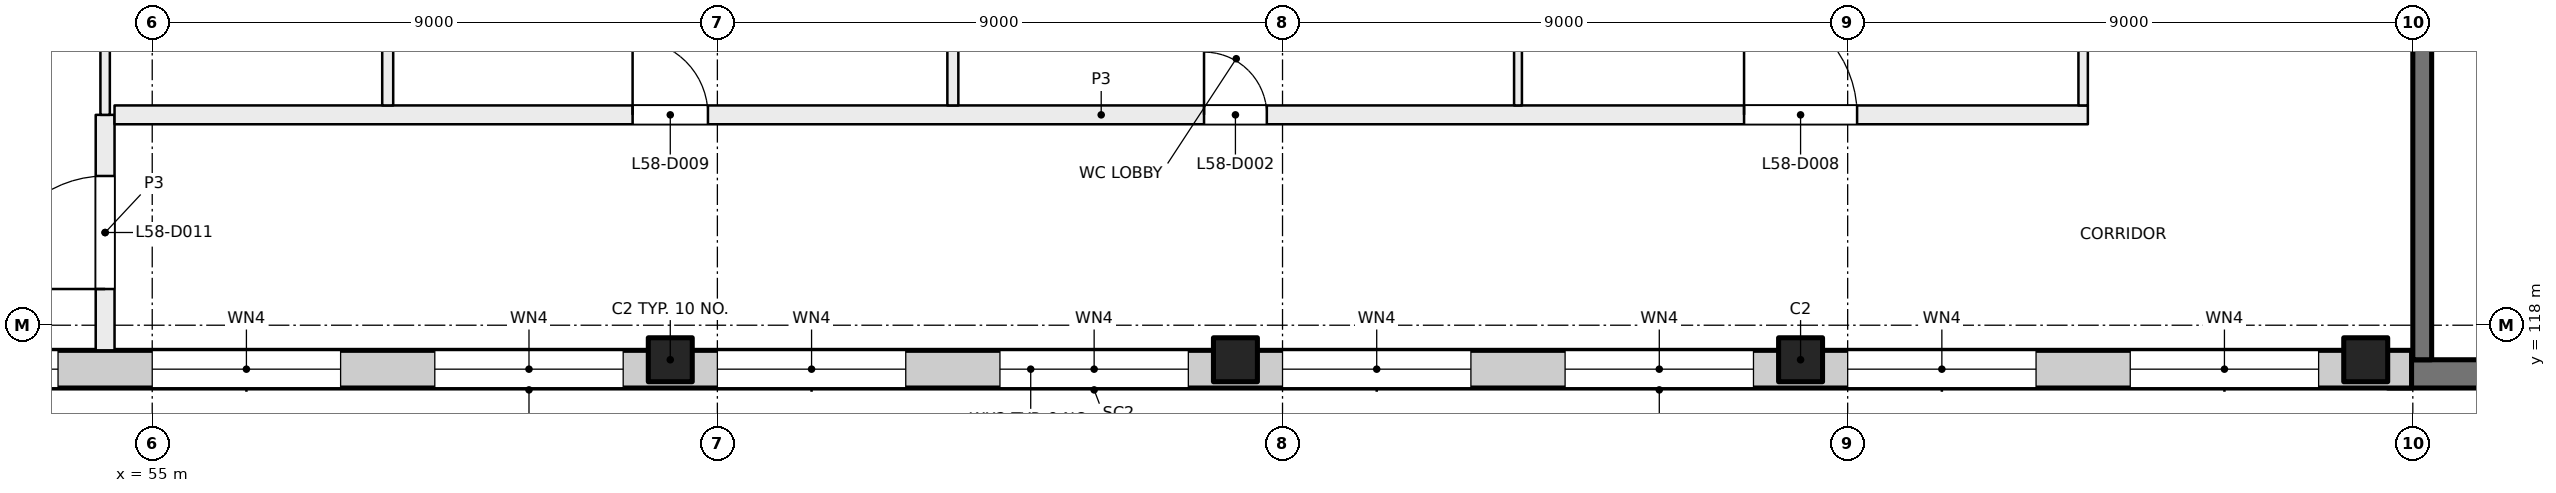
"""IFC4 building model, lengths in metres.
Left out: names, types, materials, properties, quantities, classifications, styles, units other than length and angle.
Written with IfcOpenShell. Run it as: python <this file> out.ifc"""

import sys

from ifc_helpers import new_model, si_unit, direction, frame, frame_2d, origin, origin_2d, place, context, subcontext, project, spatial, rectangle, extrude, element, fill, save


model = new_model("IFC4")
c1 = context("Model", 3, precision=1e-05, world=origin(), true_north=direction((0.0, 1.0)))
c2 = subcontext(c1, "Body", "Model", "MODEL_VIEW")
j1 = project(units=[si_unit("LENGTHUNIT", "METRE"), si_unit("PLANEANGLEUNIT", "RADIAN")], contexts=[c1])
p1 = place(None, origin())
s1 = spatial("IfcSite", under=j1, at=p1, CompositionType="ELEMENT")
p2 = place(p1, origin())
s2 = spatial("IfcBuilding", under=s1, at=p2, CompositionType="ELEMENT")
p3 = place(p2, frame((0.0, 0.0, 245.5)))
s3 = spatial("IfcBuildingStorey", under=s2, at=p3, CompositionType="ELEMENT", Elevation=245.5)
for number, where, z_axis, x_axis in (
    (1, (63.25, 117.45, 0.0), (0.0, 0.0, 1.0), (1.0, 0.0, 0.0)),
    (2, (72.25, 117.45, 0.0), (0.0, 0.0, 1.0), (1.0, 0.0, 0.0)),
    (3, (81.25, 117.45, 0.0), (0.0, 0.0, 1.0), (1.0, 0.0, 0.0)),
    (4, (90.25, 117.45, 0.0), (0.0, 0.0, 1.0), (1.0, 0.0, 0.0)),
):
    element("IfcColumn", number, at=place(p3, frame(where, z_axis=z_axis, x_axis=x_axis)), inside=s3, PredefinedType="COLUMN", context=c2, shape_type="SweptSolid", body=[
        extrude(rectangle(XDim=0.7, YDim=0.7, at=origin_2d()), origin(), (0.0, 0.0, 1.0), 4.0),
    ])
p4 = place(p3, frame((99.6, 117.225, 0.0), z_axis=(0.0, 0.0, 1.0), x_axis=(-1.0, 0.0, 0.0)))
e5 = element("IfcWall", 5, at=p4, inside=s3, PredefinedType="SHEAR", context=c2, shape_type="SweptSolid", body=[
    extrude(rectangle(XDim=9.0, YDim=0.45, at=frame_2d((4.5, 0.0))), origin(), (0.0, 0.0, 1.0), 4.0),
])
p5 = place(p3, frame((91.15, 126.2, 0.0), z_axis=(0.0, 0.0, 1.0), x_axis=(0.0, -1.0, 0.0)))
e6 = element("IfcWall", 6, at=p5, inside=s3, PredefinedType="SHEAR", context=c2, shape_type="SweptSolid", body=[
    extrude(rectangle(XDim=8.75, YDim=0.3, at=frame_2d((4.375, 0.0))), origin(), (0.0, 0.0, 1.0), 4.0),
])
p6 = place(p3, frame((90.98, 117.3, 0.0), z_axis=(0.0, 0.0, 1.0), x_axis=(-1.0, 0.0, 0.0)))
e7 = element("IfcWall", 7, at=p6, inside=s3, PredefinedType="SOLIDWALL", context=c2, shape_type="SweptSolid", body=[
    extrude(rectangle(XDim=43.98, YDim=0.6, at=frame_2d((21.99, 0.0))), origin(), (0.0, 0.0, 1.0), 3.625),
])
p7 = place(p6, frame((1.48, 0.0, 0.9)))
e8 = element("IfcOpeningElement", 8, at=p7, cuts=e7, PredefinedType="OPENING", context=c2, shape_type="SweptSolid", body=[
    extrude(rectangle(XDim=3.0, YDim=2.4, at=frame_2d((1.5, 1.2))), frame((0.0, 0.31, 0.0), z_axis=(0.0, -1.0, 0.0), x_axis=(1.0, 0.0, 0.0)), (0.0, 0.0, 1.0), 0.62),
])
p8 = place(p6, frame((5.98, 0.0, 0.9)))
e9 = element("IfcOpeningElement", 9, at=p8, cuts=e7, PredefinedType="OPENING", context=c2, shape_type="SweptSolid", body=[
    extrude(rectangle(XDim=3.0, YDim=2.4, at=frame_2d((1.5, 1.2))), frame((0.0, 0.31, 0.0), z_axis=(0.0, -1.0, 0.0), x_axis=(1.0, 0.0, 0.0)), (0.0, 0.0, 1.0), 0.62),
])
p9 = place(p6, frame((10.48, 0.0, 0.9)))
e10 = element("IfcOpeningElement", 10, at=p9, cuts=e7, PredefinedType="OPENING", context=c2, shape_type="SweptSolid", body=[
    extrude(rectangle(XDim=3.0, YDim=2.4, at=frame_2d((1.5, 1.2))), frame((0.0, 0.31, 0.0), z_axis=(0.0, -1.0, 0.0), x_axis=(1.0, 0.0, 0.0)), (0.0, 0.0, 1.0), 0.62),
])
p10 = place(p6, frame((14.98, 0.0, 0.9)))
e11 = element("IfcOpeningElement", 11, at=p10, cuts=e7, PredefinedType="OPENING", context=c2, shape_type="SweptSolid", body=[
    extrude(rectangle(XDim=3.0, YDim=2.4, at=frame_2d((1.5, 1.2))), frame((0.0, 0.31, 0.0), z_axis=(0.0, -1.0, 0.0), x_axis=(1.0, 0.0, 0.0)), (0.0, 0.0, 1.0), 0.62),
])
p11 = place(p6, frame((19.48, 0.0, 0.9)))
e12 = element("IfcOpeningElement", 12, at=p11, cuts=e7, PredefinedType="OPENING", context=c2, shape_type="SweptSolid", body=[
    extrude(rectangle(XDim=3.0, YDim=2.4, at=frame_2d((1.5, 1.2))), frame((0.0, 0.31, 0.0), z_axis=(0.0, -1.0, 0.0), x_axis=(1.0, 0.0, 0.0)), (0.0, 0.0, 1.0), 0.62),
])
p12 = place(p6, frame((23.98, 0.0, 0.9)))
e13 = element("IfcOpeningElement", 13, at=p12, cuts=e7, PredefinedType="OPENING", context=c2, shape_type="SweptSolid", body=[
    extrude(rectangle(XDim=3.0, YDim=2.4, at=frame_2d((1.5, 1.2))), frame((0.0, 0.31, 0.0), z_axis=(0.0, -1.0, 0.0), x_axis=(1.0, 0.0, 0.0)), (0.0, 0.0, 1.0), 0.62),
])
p13 = place(p6, frame((28.48, 0.0, 0.9)))
e14 = element("IfcOpeningElement", 14, at=p13, cuts=e7, PredefinedType="OPENING", context=c2, shape_type="SweptSolid", body=[
    extrude(rectangle(XDim=3.0, YDim=2.4, at=frame_2d((1.5, 1.2))), frame((0.0, 0.31, 0.0), z_axis=(0.0, -1.0, 0.0), x_axis=(1.0, 0.0, 0.0)), (0.0, 0.0, 1.0), 0.62),
])
p14 = place(p6, frame((32.98, 0.0, 0.9)))
e15 = element("IfcOpeningElement", 15, at=p14, cuts=e7, PredefinedType="OPENING", context=c2, shape_type="SweptSolid", body=[
    extrude(rectangle(XDim=3.0, YDim=2.4, at=frame_2d((1.5, 1.2))), frame((0.0, 0.31, 0.0), z_axis=(0.0, -1.0, 0.0), x_axis=(1.0, 0.0, 0.0)), (0.0, 0.0, 1.0), 0.62),
])
p15 = place(p6, frame((37.48, 0.0, 0.9)))
e16 = element("IfcOpeningElement", 16, at=p15, cuts=e7, PredefinedType="OPENING", context=c2, shape_type="SweptSolid", body=[
    extrude(rectangle(XDim=3.0, YDim=2.4, at=frame_2d((1.5, 1.2))), frame((0.0, 0.31, 0.0), z_axis=(0.0, -1.0, 0.0), x_axis=(1.0, 0.0, 0.0)), (0.0, 0.0, 1.0), 0.62),
])
p16 = place(p3, frame((54.25, 117.6, 0.0), z_axis=(0.0, 0.0, 1.0), x_axis=(0.0, 1.0, 0.0)))
e17 = element("IfcWall", 17, at=p16, inside=s3, PredefinedType="PARTITIONING", context=c2, shape_type="SweptSolid", body=[
    extrude(rectangle(XDim=3.75, YDim=0.3, at=frame_2d((1.875, 0.0))), origin(), (0.0, 0.0, 1.0), 3.625),
])
p17 = place(p16, frame((0.977, 0.0, 0.0)))
e18 = element("IfcOpeningElement", 18, at=p17, cuts=e17, PredefinedType="OPENING", context=c2, shape_type="SweptSolid", body=[
    extrude(rectangle(XDim=1.8, YDim=2.1, at=frame_2d((0.9, 1.05))), frame((0.0, 0.16, 0.0), z_axis=(0.0, -1.0, 0.0), x_axis=(1.0, 0.0, 0.0)), (0.0, 0.0, 1.0), 0.32),
])
p18 = place(p3, frame((54.4, 121.35, 0.0), z_axis=(0.0, 0.0, 1.0), x_axis=(1.0, 0.0, 0.0)))
e19 = element("IfcWall", 19, at=p18, inside=s3, PredefinedType="PARTITIONING", context=c2, shape_type="SweptSolid", body=[
    extrude(rectangle(XDim=31.425, YDim=0.3, at=frame_2d((15.712, 0.0))), origin(), (0.0, 0.0, 1.0), 3.625),
])
p19 = place(p18, frame((17.35, 0.0, 0.0)))
e20 = element("IfcOpeningElement", 20, at=p19, cuts=e19, PredefinedType="OPENING", context=c2, shape_type="SweptSolid", body=[
    extrude(rectangle(XDim=1.0, YDim=2.1, at=frame_2d((0.5, 1.05))), frame((0.0, 0.16, 0.0), z_axis=(0.0, -1.0, 0.0), x_axis=(1.0, 0.0, 0.0)), (0.0, 0.0, 1.0), 0.32),
])
p20 = place(p18, frame((25.95, 0.0, 0.0)))
e21 = element("IfcOpeningElement", 21, at=p20, cuts=e19, PredefinedType="OPENING", context=c2, shape_type="SweptSolid", body=[
    extrude(rectangle(XDim=1.8, YDim=2.1, at=frame_2d((0.9, 1.05))), frame((0.0, 0.16, 0.0), z_axis=(0.0, -1.0, 0.0), x_axis=(1.0, 0.0, 0.0)), (0.0, 0.0, 1.0), 0.32),
])
p21 = place(p18, frame((8.25, 0.0, 0.0)))
e22 = element("IfcOpeningElement", 22, at=p21, cuts=e19, PredefinedType="OPENING", context=c2, shape_type="SweptSolid", body=[
    extrude(rectangle(XDim=1.2, YDim=2.1, at=frame_2d((0.6, 1.05))), frame((0.0, 0.16, 0.0), z_axis=(0.0, -1.0, 0.0), x_axis=(1.0, 0.0, 0.0)), (0.0, 0.0, 1.0), 0.32),
])
p22 = place(p3, frame((54.25, 134.0, 0.0), z_axis=(0.0, 0.0, 1.0), x_axis=(0.0, -1.0, 0.0)))
e23 = element("IfcWall", 23, at=p22, inside=s3, PredefinedType="PARTITIONING", context=c2, shape_type="SweptSolid", body=[
    extrude(rectangle(XDim=12.65, YDim=0.15, at=frame_2d((6.325, 0.0))), origin(), (0.0, 0.0, 1.0), 3.625),
])
p23 = place(p22, frame((5.425, 0.0, 0.0)))
e24 = element("IfcOpeningElement", 24, at=p23, cuts=e23, PredefinedType="OPENING", context=c2, shape_type="SweptSolid", body=[
    extrude(rectangle(XDim=1.8, YDim=2.1, at=frame_2d((0.9, 1.05))), frame((0.0, 0.085, 0.0), z_axis=(0.0, -1.0, 0.0), x_axis=(1.0, 0.0, 0.0)), (0.0, 0.0, 1.0), 0.17),
])
p24 = place(p3, frame((58.75, 125.912, 0.0), z_axis=(0.0, 0.0, 1.0), x_axis=(0.0, -1.0, 0.0)))
e25 = element("IfcWall", 25, at=p24, inside=s3, PredefinedType="PARTITIONING", context=c2, shape_type="SweptSolid", body=[
    extrude(rectangle(XDim=4.412, YDim=0.175, at=frame_2d((2.206, 0.0))), origin(), (0.0, 0.0, 1.0), 3.625),
])
p25 = place(p3, frame((67.75, 121.5, 0.0), z_axis=(0.0, 0.0, 1.0), x_axis=(0.0, 1.0, 0.0)))
e26 = element("IfcWall", 26, at=p25, inside=s3, PredefinedType="PARTITIONING", context=c2, shape_type="SweptSolid", body=[
    extrude(rectangle(XDim=8.4, YDim=0.175, at=frame_2d((4.2, 0.0))), origin(), (0.0, 0.0, 1.0), 3.625),
])
p26 = place(p3, frame((76.75, 125.938, 0.0), z_axis=(0.0, 0.0, 1.0), x_axis=(0.0, -1.0, 0.0)))
e27 = element("IfcWall", 27, at=p26, inside=s3, PredefinedType="PARTITIONING", context=c2, shape_type="SweptSolid", body=[
    extrude(rectangle(XDim=4.438, YDim=0.125, at=frame_2d((2.219, 0.0))), origin(), (0.0, 0.0, 1.0), 3.625),
])
p27 = place(p3, frame((85.75, 121.5, 0.0), z_axis=(0.0, 0.0, 1.0), x_axis=(0.0, 1.0, 0.0)))
e28 = element("IfcWall", 28, at=p27, inside=s3, PredefinedType="PARTITIONING", context=c2, shape_type="SweptSolid", body=[
    extrude(rectangle(XDim=8.45, YDim=0.15, at=frame_2d((4.225, 0.0))), origin(), (0.0, 0.0, 1.0), 3.625),
])
p28 = place(p7, origin())
e29 = element("IfcWindow", 29, at=p28, inside=s3, PartitioningType="SINGLE_PANEL", PredefinedType="WINDOW", context=c2, shape_type="SweptSolid", body=[
    extrude(rectangle(XDim=3.0, YDim=2.4, at=frame_2d((1.5, 1.2))), frame((0.0, 0.03, 0.0), z_axis=(0.0, -1.0, 0.0), x_axis=(1.0, 0.0, 0.0)), (0.0, 0.0, 1.0), 0.06),
])
fill(e8, e29)
p29 = place(p8, origin())
e30 = element("IfcWindow", 30, at=p29, inside=s3, PartitioningType="SINGLE_PANEL", PredefinedType="WINDOW", context=c2, shape_type="SweptSolid", body=[
    extrude(rectangle(XDim=3.0, YDim=2.4, at=frame_2d((1.5, 1.2))), frame((0.0, 0.03, 0.0), z_axis=(0.0, -1.0, 0.0), x_axis=(1.0, 0.0, 0.0)), (0.0, 0.0, 1.0), 0.06),
])
fill(e9, e30)
p30 = place(p9, origin())
e31 = element("IfcWindow", 31, at=p30, inside=s3, PartitioningType="SINGLE_PANEL", PredefinedType="WINDOW", context=c2, shape_type="SweptSolid", body=[
    extrude(rectangle(XDim=3.0, YDim=2.4, at=frame_2d((1.5, 1.2))), frame((0.0, 0.03, 0.0), z_axis=(0.0, -1.0, 0.0), x_axis=(1.0, 0.0, 0.0)), (0.0, 0.0, 1.0), 0.06),
])
fill(e10, e31)
p31 = place(p10, origin())
e32 = element("IfcWindow", 32, at=p31, inside=s3, PartitioningType="SINGLE_PANEL", PredefinedType="WINDOW", context=c2, shape_type="SweptSolid", body=[
    extrude(rectangle(XDim=3.0, YDim=2.4, at=frame_2d((1.5, 1.2))), frame((0.0, 0.03, 0.0), z_axis=(0.0, -1.0, 0.0), x_axis=(1.0, 0.0, 0.0)), (0.0, 0.0, 1.0), 0.06),
])
fill(e11, e32)
p32 = place(p11, origin())
e33 = element("IfcWindow", 33, at=p32, inside=s3, PartitioningType="SINGLE_PANEL", PredefinedType="WINDOW", context=c2, shape_type="SweptSolid", body=[
    extrude(rectangle(XDim=3.0, YDim=2.4, at=frame_2d((1.5, 1.2))), frame((0.0, 0.03, 0.0), z_axis=(0.0, -1.0, 0.0), x_axis=(1.0, 0.0, 0.0)), (0.0, 0.0, 1.0), 0.06),
])
fill(e12, e33)
p33 = place(p12, origin())
e34 = element("IfcWindow", 34, at=p33, inside=s3, PartitioningType="SINGLE_PANEL", PredefinedType="WINDOW", context=c2, shape_type="SweptSolid", body=[
    extrude(rectangle(XDim=3.0, YDim=2.4, at=frame_2d((1.5, 1.2))), frame((0.0, 0.03, 0.0), z_axis=(0.0, -1.0, 0.0), x_axis=(1.0, 0.0, 0.0)), (0.0, 0.0, 1.0), 0.06),
])
fill(e13, e34)
p34 = place(p13, origin())
e35 = element("IfcWindow", 35, at=p34, inside=s3, PartitioningType="SINGLE_PANEL", PredefinedType="WINDOW", context=c2, shape_type="SweptSolid", body=[
    extrude(rectangle(XDim=3.0, YDim=2.4, at=frame_2d((1.5, 1.2))), frame((0.0, 0.03, 0.0), z_axis=(0.0, -1.0, 0.0), x_axis=(1.0, 0.0, 0.0)), (0.0, 0.0, 1.0), 0.06),
])
fill(e14, e35)
p35 = place(p14, origin())
e36 = element("IfcWindow", 36, at=p35, inside=s3, PartitioningType="SINGLE_PANEL", PredefinedType="WINDOW", context=c2, shape_type="SweptSolid", body=[
    extrude(rectangle(XDim=3.0, YDim=2.4, at=frame_2d((1.5, 1.2))), frame((0.0, 0.03, 0.0), z_axis=(0.0, -1.0, 0.0), x_axis=(1.0, 0.0, 0.0)), (0.0, 0.0, 1.0), 0.06),
])
fill(e15, e36)
p36 = place(p15, origin())
e37 = element("IfcWindow", 37, at=p36, inside=s3, PartitioningType="SINGLE_PANEL", PredefinedType="WINDOW", context=c2, shape_type="SweptSolid", body=[
    extrude(rectangle(XDim=3.0, YDim=2.4, at=frame_2d((1.5, 1.2))), frame((0.0, 0.03, 0.0), z_axis=(0.0, -1.0, 0.0), x_axis=(1.0, 0.0, 0.0)), (0.0, 0.0, 1.0), 0.06),
])
fill(e16, e37)
p37 = place(p19, origin())
e38 = element("IfcDoor", 38, at=p37, inside=s3, OperationType="SINGLE_SWING_LEFT", PredefinedType="DOOR", context=c2, shape_type="SweptSolid", body=[
    extrude(rectangle(XDim=1.0, YDim=2.1, at=frame_2d((0.5, 1.05))), frame((0.0, 0.025, 0.0), z_axis=(0.0, -1.0, 0.0), x_axis=(1.0, 0.0, 0.0)), (0.0, 0.0, 1.0), 0.05),
])
fill(e20, e38)
p38 = place(p20, origin())
e39 = element("IfcDoor", 39, at=p38, inside=s3, OperationType="DOUBLE_DOOR_SINGLE_SWING", PredefinedType="DOOR", context=c2, shape_type="SweptSolid", body=[
    extrude(rectangle(XDim=1.8, YDim=2.1, at=frame_2d((0.9, 1.05))), frame((0.0, 0.025, 0.0), z_axis=(0.0, -1.0, 0.0), x_axis=(1.0, 0.0, 0.0)), (0.0, 0.0, 1.0), 0.05),
])
fill(e21, e39)
p39 = place(p21, origin())
e40 = element("IfcDoor", 40, at=p39, inside=s3, OperationType="DOUBLE_DOOR_SINGLE_SWING", PredefinedType="DOOR", context=c2, shape_type="SweptSolid", body=[
    extrude(rectangle(XDim=1.2, YDim=2.1, at=frame_2d((0.6, 1.05))), frame((0.0, 0.025, 0.0), z_axis=(0.0, -1.0, 0.0), x_axis=(1.0, 0.0, 0.0)), (0.0, 0.0, 1.0), 0.05),
])
fill(e22, e40)
p40 = place(p17, origin())
e41 = element("IfcDoor", 41, at=p40, inside=s3, OperationType="DOUBLE_DOOR_SINGLE_SWING", PredefinedType="DOOR", context=c2, shape_type="SweptSolid", body=[
    extrude(rectangle(XDim=1.8, YDim=2.1, at=frame_2d((0.9, 1.05))), frame((0.0, 0.025, 0.0), z_axis=(0.0, -1.0, 0.0), x_axis=(1.0, 0.0, 0.0)), (0.0, 0.0, 1.0), 0.05),
])
fill(e18, e41)
save(model, sys.argv[1])
